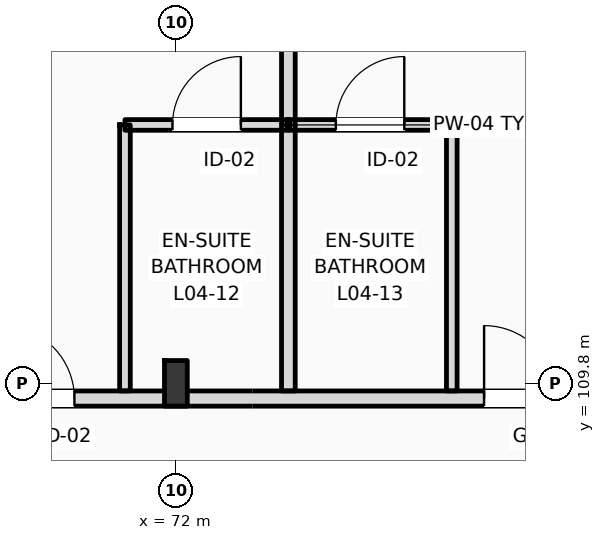
"""IFC4 building model, lengths in metres.
Left out: names, types, materials, properties, quantities, classifications, styles, units other than length and angle.
Written with IfcOpenShell. Run it as: python <this file> out.ifc"""

import sys

from ifc_helpers import new_model, si_unit, direction, frame, frame_2d, origin, origin_2d, place, context, subcontext, project, spatial, rectangle, i_section, extrude, element, fill, save


model = new_model("IFC4")
c1 = context("Model", 3, precision=1e-05, world=origin(), true_north=direction((0.0, 1.0)))
c2 = subcontext(c1, "Body", "Model", "MODEL_VIEW")
j1 = project(units=[si_unit("LENGTHUNIT", "METRE"), si_unit("PLANEANGLEUNIT", "RADIAN")], contexts=[c1])
p1 = place(None, origin())
s1 = spatial("IfcSite", under=j1, at=p1, CompositionType="ELEMENT")
p2 = place(p1, origin())
s2 = spatial("IfcBuilding", under=s1, at=p2, CompositionType="ELEMENT")
p3 = place(p2, frame((0.0, 0.0, 20.4)))
s3 = spatial("IfcBuildingStorey", under=s2, at=p3, CompositionType="ELEMENT", Elevation=20.4)
p4 = place(p3, frame((72.0, 109.8, 0.0), z_axis=(0.0, 0.0, 1.0), x_axis=(1.0, 0.0, 0.0)))
e1 = element("IfcColumn", 1, at=p4, inside=s3, PredefinedType="COLUMN", context=c2, shape_type="SweptSolid", body=[
    extrude(i_section(OverallWidth=0.3, OverallDepth=0.6, WebThickness=0.015, FlangeThickness=0.03, FilletRadius=0.027, at=origin_2d()), origin(), (0.0, 0.0, 1.0), 4.2),
])
p5 = place(p3, frame((10.65, 109.6, 0.0), z_axis=(0.0, 0.0, 1.0), x_axis=(1.0, 0.0, 0.0)))
e2 = element("IfcWall", 2, at=p5, inside=s3, PredefinedType="PARTITIONING", context=c2, shape_type="SweptSolid", body=[
    extrude(rectangle(XDim=109.21, YDim=0.2, at=frame_2d((54.605, 0.0))), origin(), (0.0, 0.0, 1.0), 3.38),
])
p6 = place(p5, frame((12.535, 0.0, 0.0)))
e3 = element("IfcOpeningElement", 3, at=p6, cuts=e2, PredefinedType="OPENING", context=c2, shape_type="SweptSolid", body=[
    extrude(rectangle(XDim=1.02, YDim=2.2, at=frame_2d((0.51, 1.1))), frame((0.0, 0.11, 0.0), z_axis=(0.0, -1.0, 0.0), x_axis=(1.0, 0.0, 0.0)), (0.0, 0.0, 1.0), 0.22),
])
p7 = place(p5, frame((19.175, 0.0, 0.0)))
e4 = element("IfcOpeningElement", 4, at=p7, cuts=e2, PredefinedType="OPENING", context=c2, shape_type="SweptSolid", body=[
    extrude(rectangle(XDim=1.02, YDim=2.2, at=frame_2d((0.51, 1.1))), frame((0.0, 0.11, 0.0), z_axis=(0.0, -1.0, 0.0), x_axis=(1.0, 0.0, 0.0)), (0.0, 0.0, 1.0), 0.22),
])
p8 = place(p5, frame((23.375, 0.0, 0.0)))
e5 = element("IfcOpeningElement", 5, at=p8, cuts=e2, PredefinedType="OPENING", context=c2, shape_type="SweptSolid", body=[
    extrude(rectangle(XDim=1.02, YDim=2.2, at=frame_2d((0.51, 1.1))), frame((0.0, 0.11, 0.0), z_axis=(0.0, -1.0, 0.0), x_axis=(1.0, 0.0, 0.0)), (0.0, 0.0, 1.0), 0.22),
])
p9 = place(p5, frame((27.575, 0.0, 0.0)))
e6 = element("IfcOpeningElement", 6, at=p9, cuts=e2, PredefinedType="OPENING", context=c2, shape_type="SweptSolid", body=[
    extrude(rectangle(XDim=1.02, YDim=2.2, at=frame_2d((0.51, 1.1))), frame((0.0, 0.11, 0.0), z_axis=(0.0, -1.0, 0.0), x_axis=(1.0, 0.0, 0.0)), (0.0, 0.0, 1.0), 0.22),
])
p10 = place(p5, frame((31.805, 0.0, 0.0)))
e7 = element("IfcOpeningElement", 7, at=p10, cuts=e2, PredefinedType="OPENING", context=c2, shape_type="SweptSolid", body=[
    extrude(rectangle(XDim=0.96, YDim=2.2, at=frame_2d((0.48, 1.1))), frame((0.0, 0.11, 0.0), z_axis=(0.0, -1.0, 0.0), x_axis=(1.0, 0.0, 0.0)), (0.0, 0.0, 1.0), 0.22),
])
p11 = place(p5, frame((33.855, 0.0, 0.0)))
e8 = element("IfcOpeningElement", 8, at=p11, cuts=e2, PredefinedType="OPENING", context=c2, shape_type="SweptSolid", body=[
    extrude(rectangle(XDim=0.96, YDim=2.2, at=frame_2d((0.48, 1.1))), frame((0.0, 0.11, 0.0), z_axis=(0.0, -1.0, 0.0), x_axis=(1.0, 0.0, 0.0)), (0.0, 0.0, 1.0), 0.22),
])
p12 = place(p5, frame((40.205, 0.0, 0.0)))
e9 = element("IfcOpeningElement", 9, at=p12, cuts=e2, PredefinedType="OPENING", context=c2, shape_type="SweptSolid", body=[
    extrude(rectangle(XDim=0.96, YDim=2.2, at=frame_2d((0.48, 1.1))), frame((0.0, 0.11, 0.0), z_axis=(0.0, -1.0, 0.0), x_axis=(1.0, 0.0, 0.0)), (0.0, 0.0, 1.0), 0.22),
])
p13 = place(p5, frame((42.255, 0.0, 0.0)))
e10 = element("IfcOpeningElement", 10, at=p13, cuts=e2, PredefinedType="OPENING", context=c2, shape_type="SweptSolid", body=[
    extrude(rectangle(XDim=0.96, YDim=2.2, at=frame_2d((0.48, 1.1))), frame((0.0, 0.11, 0.0), z_axis=(0.0, -1.0, 0.0), x_axis=(1.0, 0.0, 0.0)), (0.0, 0.0, 1.0), 0.22),
])
p14 = place(p5, frame((48.605, 0.0, 0.0)))
e11 = element("IfcOpeningElement", 11, at=p14, cuts=e2, PredefinedType="OPENING", context=c2, shape_type="SweptSolid", body=[
    extrude(rectangle(XDim=0.96, YDim=2.2, at=frame_2d((0.48, 1.1))), frame((0.0, 0.11, 0.0), z_axis=(0.0, -1.0, 0.0), x_axis=(1.0, 0.0, 0.0)), (0.0, 0.0, 1.0), 0.22),
])
p15 = place(p5, frame((50.655, 0.0, 0.0)))
e12 = element("IfcOpeningElement", 12, at=p15, cuts=e2, PredefinedType="OPENING", context=c2, shape_type="SweptSolid", body=[
    extrude(rectangle(XDim=0.96, YDim=2.2, at=frame_2d((0.48, 1.1))), frame((0.0, 0.11, 0.0), z_axis=(0.0, -1.0, 0.0), x_axis=(1.0, 0.0, 0.0)), (0.0, 0.0, 1.0), 0.22),
])
p16 = place(p5, frame((57.005, 0.0, 0.0)))
e13 = element("IfcOpeningElement", 13, at=p16, cuts=e2, PredefinedType="OPENING", context=c2, shape_type="SweptSolid", body=[
    extrude(rectangle(XDim=0.96, YDim=2.2, at=frame_2d((0.48, 1.1))), frame((0.0, 0.11, 0.0), z_axis=(0.0, -1.0, 0.0), x_axis=(1.0, 0.0, 0.0)), (0.0, 0.0, 1.0), 0.22),
])
p17 = place(p5, frame((59.055, 0.0, 0.0)))
e14 = element("IfcOpeningElement", 14, at=p17, cuts=e2, PredefinedType="OPENING", context=c2, shape_type="SweptSolid", body=[
    extrude(rectangle(XDim=0.96, YDim=2.2, at=frame_2d((0.48, 1.1))), frame((0.0, 0.11, 0.0), z_axis=(0.0, -1.0, 0.0), x_axis=(1.0, 0.0, 0.0)), (0.0, 0.0, 1.0), 0.22),
])
p18 = place(p5, frame((65.405, 0.0, 0.0)))
e15 = element("IfcOpeningElement", 15, at=p18, cuts=e2, PredefinedType="OPENING", context=c2, shape_type="SweptSolid", body=[
    extrude(rectangle(XDim=0.96, YDim=2.2, at=frame_2d((0.48, 1.1))), frame((0.0, 0.11, 0.0), z_axis=(0.0, -1.0, 0.0), x_axis=(1.0, 0.0, 0.0)), (0.0, 0.0, 1.0), 0.22),
])
p19 = place(p5, frame((67.205, 0.0, 0.0)))
e16 = element("IfcOpeningElement", 16, at=p19, cuts=e2, PredefinedType="OPENING", context=c2, shape_type="SweptSolid", body=[
    extrude(rectangle(XDim=0.96, YDim=2.2, at=frame_2d((0.48, 1.1))), frame((0.0, 0.11, 0.0), z_axis=(0.0, -1.0, 0.0), x_axis=(1.0, 0.0, 0.0)), (0.0, 0.0, 1.0), 0.22),
])
p20 = place(p5, frame((73.805, 0.0, 0.0)))
e17 = element("IfcOpeningElement", 17, at=p20, cuts=e2, PredefinedType="OPENING", context=c2, shape_type="SweptSolid", body=[
    extrude(rectangle(XDim=0.96, YDim=2.2, at=frame_2d((0.48, 1.1))), frame((0.0, 0.11, 0.0), z_axis=(0.0, -1.0, 0.0), x_axis=(1.0, 0.0, 0.0)), (0.0, 0.0, 1.0), 0.22),
])
p21 = place(p5, frame((78.255, 0.0, 0.0)))
e18 = element("IfcOpeningElement", 18, at=p21, cuts=e2, PredefinedType="OPENING", context=c2, shape_type="SweptSolid", body=[
    extrude(rectangle(XDim=0.96, YDim=2.2, at=frame_2d((0.48, 1.1))), frame((0.0, 0.11, 0.0), z_axis=(0.0, -1.0, 0.0), x_axis=(1.0, 0.0, 0.0)), (0.0, 0.0, 1.0), 0.22),
])
p22 = place(p5, frame((82.205, 0.0, 0.0)))
e19 = element("IfcOpeningElement", 19, at=p22, cuts=e2, PredefinedType="OPENING", context=c2, shape_type="SweptSolid", body=[
    extrude(rectangle(XDim=0.96, YDim=2.2, at=frame_2d((0.48, 1.1))), frame((0.0, 0.11, 0.0), z_axis=(0.0, -1.0, 0.0), x_axis=(1.0, 0.0, 0.0)), (0.0, 0.0, 1.0), 0.22),
])
p23 = place(p5, frame((86.405, 0.0, 0.0)))
e20 = element("IfcOpeningElement", 20, at=p23, cuts=e2, PredefinedType="OPENING", context=c2, shape_type="SweptSolid", body=[
    extrude(rectangle(XDim=0.96, YDim=2.2, at=frame_2d((0.48, 1.1))), frame((0.0, 0.11, 0.0), z_axis=(0.0, -1.0, 0.0), x_axis=(1.0, 0.0, 0.0)), (0.0, 0.0, 1.0), 0.22),
])
p24 = place(p5, frame((90.605, 0.0, 0.0)))
e21 = element("IfcOpeningElement", 21, at=p24, cuts=e2, PredefinedType="OPENING", context=c2, shape_type="SweptSolid", body=[
    extrude(rectangle(XDim=0.96, YDim=2.2, at=frame_2d((0.48, 1.1))), frame((0.0, 0.11, 0.0), z_axis=(0.0, -1.0, 0.0), x_axis=(1.0, 0.0, 0.0)), (0.0, 0.0, 1.0), 0.22),
])
p25 = place(p5, frame((94.805, 0.0, 0.0)))
e22 = element("IfcOpeningElement", 22, at=p25, cuts=e2, PredefinedType="OPENING", context=c2, shape_type="SweptSolid", body=[
    extrude(rectangle(XDim=0.96, YDim=2.2, at=frame_2d((0.48, 1.1))), frame((0.0, 0.11, 0.0), z_axis=(0.0, -1.0, 0.0), x_axis=(1.0, 0.0, 0.0)), (0.0, 0.0, 1.0), 0.22),
])
p26 = place(p5, frame((99.005, 0.0, 0.0)))
e23 = element("IfcOpeningElement", 23, at=p26, cuts=e2, PredefinedType="OPENING", context=c2, shape_type="SweptSolid", body=[
    extrude(rectangle(XDim=0.96, YDim=2.2, at=frame_2d((0.48, 1.1))), frame((0.0, 0.11, 0.0), z_axis=(0.0, -1.0, 0.0), x_axis=(1.0, 0.0, 0.0)), (0.0, 0.0, 1.0), 0.22),
])
p27 = place(p5, frame((103.205, 0.0, 0.0)))
e24 = element("IfcOpeningElement", 24, at=p27, cuts=e2, PredefinedType="OPENING", context=c2, shape_type="SweptSolid", body=[
    extrude(rectangle(XDim=0.96, YDim=2.2, at=frame_2d((0.48, 1.1))), frame((0.0, 0.11, 0.0), z_axis=(0.0, -1.0, 0.0), x_axis=(1.0, 0.0, 0.0)), (0.0, 0.0, 1.0), 0.22),
])
p28 = place(p5, frame((105.335, 0.0, 0.0)))
e25 = element("IfcOpeningElement", 25, at=p28, cuts=e2, PredefinedType="OPENING", context=c2, shape_type="SweptSolid", body=[
    extrude(rectangle(XDim=0.96, YDim=2.2, at=frame_2d((0.48, 1.1))), frame((0.0, 0.11, 0.0), z_axis=(0.0, -1.0, 0.0), x_axis=(1.0, 0.0, 0.0)), (0.0, 0.0, 1.0), 0.22),
])
p29 = place(p5, frame((2.716, 0.0, 0.0)))
e26 = element("IfcOpeningElement", 26, at=p29, cuts=e2, PredefinedType="OPENING", context=c2, shape_type="SweptSolid", body=[
    extrude(rectangle(XDim=1.35, YDim=2.25, at=frame_2d((0.675, 1.125))), frame((0.0, 0.11, 0.0), z_axis=(0.0, -1.0, 0.0), x_axis=(1.0, 0.0, 0.0)), (0.0, 0.0, 1.0), 0.22),
])
p30 = place(p5, frame((6.65, 0.0, 0.0)))
e27 = element("IfcOpeningElement", 27, at=p30, cuts=e2, PredefinedType="OPENING", context=c2, shape_type="SweptSolid", body=[
    extrude(rectangle(XDim=1.35, YDim=2.25, at=frame_2d((0.675, 1.125))), frame((0.0, 0.11, 0.0), z_axis=(0.0, -1.0, 0.0), x_axis=(1.0, 0.0, 0.0)), (0.0, 0.0, 1.0), 0.22),
])
p31 = place(p5, frame((10.583, 0.0, 0.0)))
e28 = element("IfcOpeningElement", 28, at=p31, cuts=e2, PredefinedType="OPENING", context=c2, shape_type="SweptSolid", body=[
    extrude(rectangle(XDim=1.35, YDim=2.25, at=frame_2d((0.675, 1.125))), frame((0.0, 0.11, 0.0), z_axis=(0.0, -1.0, 0.0), x_axis=(1.0, 0.0, 0.0)), (0.0, 0.0, 1.0), 0.22),
])
p32 = place(p3, frame((73.48, 109.7, 0.0), z_axis=(0.0, 0.0, 1.0), x_axis=(0.0, 1.0, 0.0)))
e29 = element("IfcWall", 29, at=p32, inside=s3, PredefinedType="PARTITIONING", context=c2, shape_type="SweptSolid", body=[
    extrude(rectangle(XDim=8.15, YDim=0.18, at=frame_2d((4.075, 0.0))), origin(), (0.0, 0.0, 1.0), 3.94),
])
p33 = place(p3, frame((71.33, 109.7, 0.0), z_axis=(0.0, 0.0, 1.0), x_axis=(0.0, 1.0, 0.0)))
e30 = element("IfcWall", 30, at=p33, inside=s3, PredefinedType="PARTITIONING", context=c2, shape_type="SweptSolid", body=[
    extrude(rectangle(XDim=3.5, YDim=0.14, at=frame_2d((1.75, 0.0))), origin(), (0.0, 0.0, 1.0), 3.94),
])
p34 = place(p3, frame((71.33, 113.2, 0.0), z_axis=(0.0, 0.0, 1.0), x_axis=(1.0, 0.0, 0.0)))
e31 = element("IfcWall", 31, at=p34, inside=s3, PredefinedType="PARTITIONING", context=c2, shape_type="SweptSolid", body=[
    extrude(rectangle(XDim=2.15, YDim=0.14, at=frame_2d((1.075, 0.0))), origin(), (0.0, 0.0, 1.0), 3.94),
])
p35 = place(p34, frame((0.625, 0.0, 0.0)))
e32 = element("IfcOpeningElement", 32, at=p35, cuts=e31, PredefinedType="OPENING", context=c2, shape_type="SweptSolid", body=[
    extrude(rectangle(XDim=0.9, YDim=2.1, at=frame_2d((0.45, 1.05))), frame((0.0, 0.08, 0.0), z_axis=(0.0, -1.0, 0.0), x_axis=(1.0, 0.0, 0.0)), (0.0, 0.0, 1.0), 0.16),
])
p36 = place(p3, frame((75.63, 109.7, 0.0), z_axis=(0.0, 0.0, 1.0), x_axis=(0.0, 1.0, 0.0)))
e33 = element("IfcWall", 33, at=p36, inside=s3, PredefinedType="PARTITIONING", context=c2, shape_type="SweptSolid", body=[
    extrude(rectangle(XDim=3.5, YDim=0.14, at=frame_2d((1.75, 0.0))), origin(), (0.0, 0.0, 1.0), 3.94),
])
p37 = place(p3, frame((73.48, 113.2, 0.0), z_axis=(0.0, 0.0, 1.0), x_axis=(1.0, 0.0, 0.0)))
e34 = element("IfcWall", 34, at=p37, inside=s3, PredefinedType="PARTITIONING", context=c2, shape_type="SweptSolid", body=[
    extrude(rectangle(XDim=2.15, YDim=0.14, at=frame_2d((1.075, 0.0))), origin(), (0.0, 0.0, 1.0), 3.94),
])
p38 = place(p37, frame((0.625, 0.0, 0.0)))
e35 = element("IfcOpeningElement", 35, at=p38, cuts=e34, PredefinedType="OPENING", context=c2, shape_type="SweptSolid", body=[
    extrude(rectangle(XDim=0.9, YDim=2.1, at=frame_2d((0.45, 1.05))), frame((0.0, 0.08, 0.0), z_axis=(0.0, -1.0, 0.0), x_axis=(1.0, 0.0, 0.0)), (0.0, 0.0, 1.0), 0.16),
])
p39 = place(p17, origin())
e36 = element("IfcDoor", 36, at=p39, inside=s3, OperationType="SINGLE_SWING_LEFT", PredefinedType="DOOR", context=c2, shape_type="SweptSolid", body=[
    extrude(rectangle(XDim=0.96, YDim=2.2, at=frame_2d((0.48, 1.1))), frame((0.0, 0.025, 0.0), z_axis=(0.0, -1.0, 0.0), x_axis=(1.0, 0.0, 0.0)), (0.0, 0.0, 1.0), 0.05),
])
fill(e14, e36)
p40 = place(p35, origin())
e37 = element("IfcDoor", 37, at=p40, inside=s3, OperationType="SINGLE_SWING_RIGHT", PredefinedType="DOOR", context=c2, shape_type="SweptSolid", body=[
    extrude(rectangle(XDim=0.9, YDim=2.1, at=frame_2d((0.45, 1.05))), frame((0.0, 0.025, 0.0), z_axis=(0.0, -1.0, 0.0), x_axis=(1.0, 0.0, 0.0)), (0.0, 0.0, 1.0), 0.05),
])
fill(e32, e37)
p41 = place(p18, origin())
e38 = element("IfcDoor", 38, at=p41, inside=s3, OperationType="SINGLE_SWING_LEFT", PredefinedType="DOOR", context=c2, shape_type="SweptSolid", body=[
    extrude(rectangle(XDim=0.96, YDim=2.2, at=frame_2d((0.48, 1.1))), frame((0.0, 0.025, 0.0), z_axis=(0.0, -1.0, 0.0), x_axis=(1.0, 0.0, 0.0)), (0.0, 0.0, 1.0), 0.05),
])
fill(e15, e38)
p42 = place(p38, origin())
e39 = element("IfcDoor", 39, at=p42, inside=s3, OperationType="SINGLE_SWING_RIGHT", PredefinedType="DOOR", context=c2, shape_type="SweptSolid", body=[
    extrude(rectangle(XDim=0.9, YDim=2.1, at=frame_2d((0.45, 1.05))), frame((0.0, 0.025, 0.0), z_axis=(0.0, -1.0, 0.0), x_axis=(1.0, 0.0, 0.0)), (0.0, 0.0, 1.0), 0.05),
])
fill(e35, e39)
save(model, sys.argv[1])
